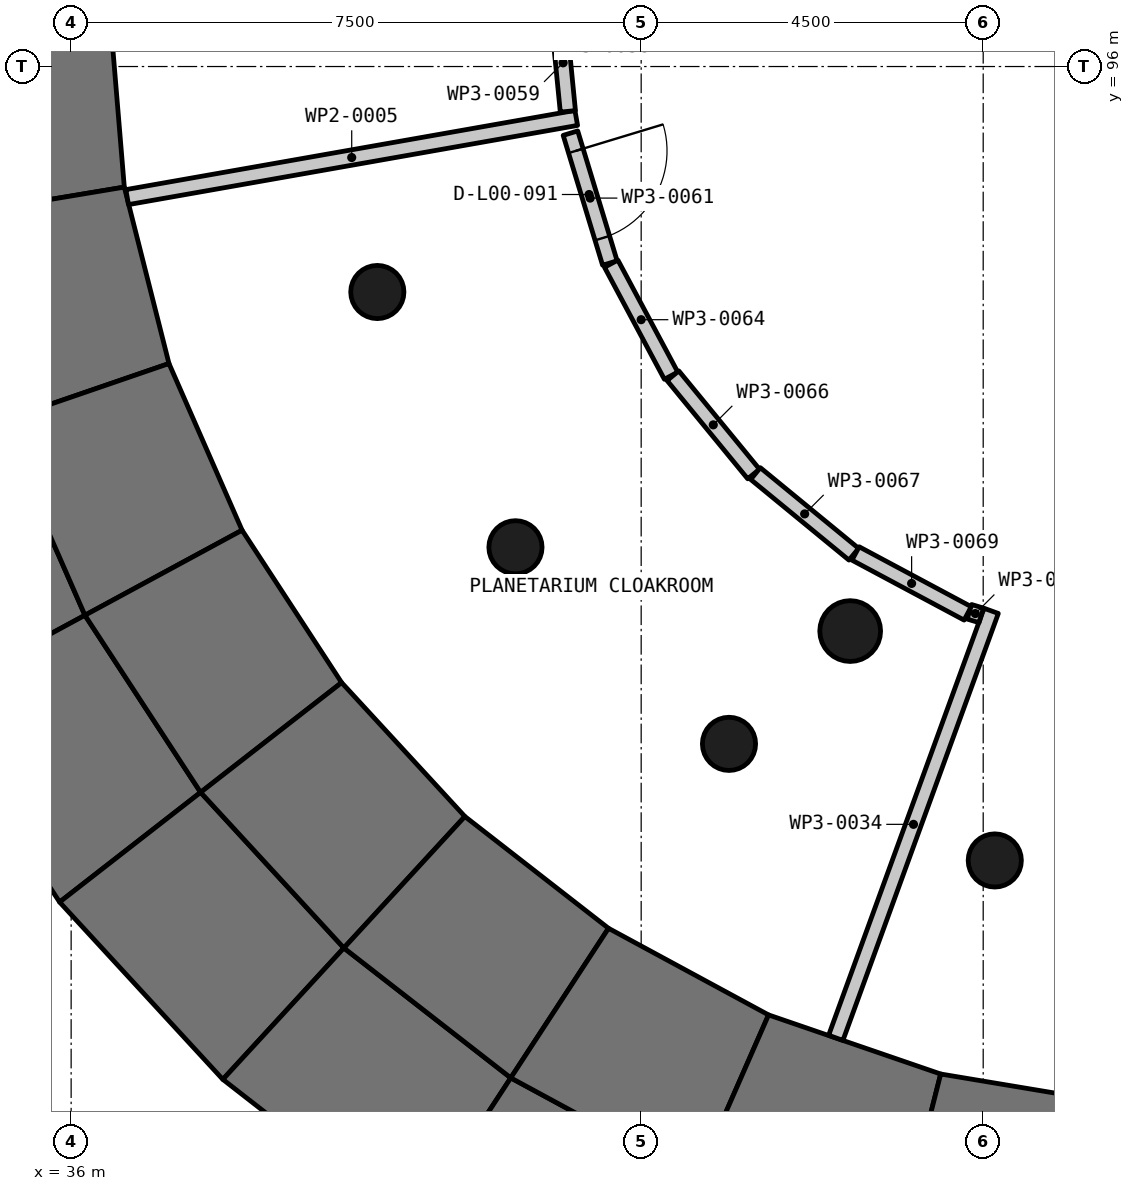
"""IFC4 building model, lengths in metres.
Left out: names, types, materials, properties, quantities, classifications, styles, units other than length and angle.
Written with IfcOpenShell. Run it as: python <this file> out.ifc"""

import sys

from ifc_helpers import new_model, si_unit, direction, frame, frame_2d, origin, origin_2d, place, context, subcontext, project, spatial, polyline, rectangle, circle, outline, extrude, element, fill, save


model = new_model("IFC4")
c1 = context("Model", 3, precision=1e-05, world=origin(), true_north=direction((0.0, 1.0)))
c2 = subcontext(c1, "Body", "Model", "MODEL_VIEW")
j1 = project(units=[si_unit("LENGTHUNIT", "METRE"), si_unit("PLANEANGLEUNIT", "RADIAN")], contexts=[c1])
p1 = place(None, origin())
s1 = spatial("IfcSite", under=j1, at=p1, CompositionType="ELEMENT")
p2 = place(p1, origin())
s2 = spatial("IfcBuilding", under=s1, at=p2, CompositionType="ELEMENT")
p3 = place(p2, origin())
s3 = spatial("IfcBuildingStorey", under=s2, at=p3, CompositionType="ELEMENT", Elevation=0.0)
p4 = place(p3, frame((46.25, 88.573, -0.2), z_axis=(0.0, 0.0, 1.0), x_axis=(1.0, 0.0, 0.0)))
e1 = element("IfcColumn", 1, at=p4, inside=s3, PredefinedType="COLUMN", context=c2, shape_type="SweptSolid", body=[
    extrude(circle(Radius=0.4, at=origin_2d()), origin(), (0.0, 0.0, 1.0), 5.9),
])
for number, where, z_axis, x_axis in (
    (2, (40.029, 93.033, -0.2), (0.0, 0.0, 1.0), (1.0, 0.0, 0.0)),
    (3, (41.846, 89.675, -0.2), (0.0, 0.0, 1.0), (1.0, 0.0, 0.0)),
    (4, (44.656, 87.089, -0.2), (0.0, 0.0, 1.0), (1.0, 0.0, 0.0)),
    (5, (48.152, 85.555, -0.2), (0.0, 0.0, 1.0), (1.0, 0.0, 0.0)),
):
    element("IfcColumn", number, at=place(p3, frame(where, z_axis=z_axis, x_axis=x_axis)), inside=s3, PredefinedType="COLUMN", context=c2, shape_type="SweptSolid", body=[
        extrude(circle(Radius=0.35, at=origin_2d()), origin(), (0.0, 0.0, 1.0), 5.9),
    ])
p5 = place(p3, frame((33.913, 91.036, -0.2), z_axis=(0.0, 0.0, 1.0), x_axis=(0.401654698368, -0.91579118978, 0.0)))
e6 = element("IfcWall", 6, at=p5, inside=s3, PredefinedType="SHEAR", context=c2, shape_type="SweptSolid", body=[
    extrude(outline(polyline([(0.0, -1.171), (3.171, -1.171), (2.977, 1.172), (0.194, 1.171), (0.0, -1.171)])), origin(), (0.0, 0.0, 1.0), 5.9),
])
p6 = place(p3, frame((35.095, 88.302, -0.2), z_axis=(0.0, 0.0, 1.0), x_axis=(0.546929878596, -0.837178420588, 0.0)))
e7 = element("IfcWall", 7, at=p6, inside=s3, PredefinedType="SHEAR", context=c2, shape_type="SweptSolid", body=[
    extrude(outline(polyline([(0.0, -1.171), (3.171, -1.171), (2.977, 1.171), (0.194, 1.172), (0.0, -1.171)])), origin(), (0.0, 0.0, 1.0), 5.9),
])
p7 = place(p3, frame((36.71, 85.801, -0.2), z_axis=(0.0, 0.0, 1.0), x_axis=(0.677243324002, -0.735759118254, 0.0)))
e8 = element("IfcWall", 8, at=p7, inside=s3, PredefinedType="SHEAR", context=c2, shape_type="SweptSolid", body=[
    extrude(outline(polyline([(0.0, -1.172), (3.171, -1.171), (2.977, 1.172), (0.194, 1.171), (0.0, -1.172)])), origin(), (0.0, 0.0, 1.0), 5.9),
])
p8 = place(p3, frame((38.716, 83.599, -0.2), z_axis=(0.0, 0.0, 1.0), x_axis=(0.789136599695, -0.614217735841, 0.0)))
e9 = element("IfcWall", 9, at=p8, inside=s3, PredefinedType="SHEAR", context=c2, shape_type="SweptSolid", body=[
    extrude(outline(polyline([(0.0, -1.172), (3.171, -1.172), (2.977, 1.172), (0.194, 1.171), (0.0, -1.172)])), origin(), (0.0, 0.0, 1.0), 5.9),
])
p9 = place(p3, frame((41.056, 81.757, -0.2), z_axis=(0.0, 0.0, 1.0), x_axis=(0.87946790064, -0.475958203778, 0.0)))
e10 = element("IfcWall", 10, at=p9, inside=s3, PredefinedType="SHEAR", context=c2, shape_type="SweptSolid", body=[
    extrude(outline(polyline([(0.0, -1.171), (3.171, -1.171), (2.977, 1.172), (0.194, 1.172), (0.0, -1.171)])), origin(), (0.0, 0.0, 1.0), 5.9),
])
p10 = place(p3, frame((35.318, 96.897, -0.2), z_axis=(0.0, 0.0, 1.0), x_axis=(0.082558992404, -0.996586179301, 0.0)))
e11 = element("IfcWall", 11, at=p10, inside=s3, PredefinedType="SHEAR", context=c2, shape_type="SweptSolid", body=[
    extrude(outline(polyline([(0.0, -1.171), (2.783, -1.171), (2.588, 1.171), (0.194, 1.171), (0.0, -1.171)])), origin(), (0.0, 0.0, 1.0), 5.9),
])
p11 = place(p3, frame((35.516, 94.314, -0.2), z_axis=(0.0, 0.0, 1.0), x_axis=(0.245569021983, -0.969379108214, 0.0)))
e12 = element("IfcWall", 12, at=p11, inside=s3, PredefinedType="SHEAR", context=c2, shape_type="SweptSolid", body=[
    extrude(outline(polyline([(0.0, -1.171), (2.783, -1.172), (2.589, 1.171), (0.194, 1.172), (0.0, -1.171)])), origin(), (0.0, 0.0, 1.0), 5.9),
])
p12 = place(p3, frame((36.136, 91.8, -0.2), z_axis=(0.0, 0.0, 1.0), x_axis=(0.401729909484, -0.915758199431, 0.0)))
e13 = element("IfcWall", 13, at=p12, inside=s3, PredefinedType="SHEAR", context=c2, shape_type="SweptSolid", body=[
    extrude(outline(polyline([(-0.0, -1.171), (2.783, -1.171), (2.589, 1.171), (0.194, 1.172), (-0.0, -1.171)])), origin(), (0.0, 0.0, 1.0), 5.9),
])
p13 = place(p3, frame((37.162, 89.421, -0.2), z_axis=(0.0, 0.0, 1.0), x_axis=(0.54694202516, -0.837170485095, 0.0)))
e14 = element("IfcWall", 14, at=p13, inside=s3, PredefinedType="SHEAR", context=c2, shape_type="SweptSolid", body=[
    extrude(outline(polyline([(0.0, -1.171), (2.783, -1.172), (2.589, 1.171), (0.194, 1.171), (0.0, -1.171)])), origin(), (0.0, 0.0, 1.0), 5.9),
])
p14 = place(p3, frame((38.565, 87.244, -0.2), z_axis=(0.0, 0.0, 1.0), x_axis=(0.677288370304, -0.735717651991, 0.0)))
e15 = element("IfcWall", 15, at=p14, inside=s3, PredefinedType="SHEAR", context=c2, shape_type="SweptSolid", body=[
    extrude(outline(polyline([(0.0, -1.171), (2.783, -1.171), (2.589, 1.172), (0.194, 1.172), (0.0, -1.171)])), origin(), (0.0, 0.0, 1.0), 5.9),
])
p15 = place(p3, frame((40.308, 85.328, -0.2), z_axis=(0.0, 0.0, 1.0), x_axis=(0.789144316107, -0.614207821797, 0.0)))
e16 = element("IfcWall", 16, at=p15, inside=s3, PredefinedType="SHEAR", context=c2, shape_type="SweptSolid", body=[
    extrude(outline(polyline([(0.0, -1.171), (2.783, -1.171), (2.589, 1.172), (0.194, 1.171), (0.0, -1.171)])), origin(), (0.0, 0.0, 1.0), 5.9),
])
p16 = place(p3, frame((42.342, 83.725, -0.2), z_axis=(0.0, 0.0, 1.0), x_axis=(0.87946337705, -0.4759665623, 0.0)))
e17 = element("IfcWall", 17, at=p16, inside=s3, PredefinedType="SHEAR", context=c2, shape_type="SweptSolid", body=[
    extrude(outline(polyline([(-0.0, -1.171), (2.782, -1.171), (2.588, 1.172), (0.194, 1.172), (-0.0, -1.171)])), origin(), (0.0, 0.0, 1.0), 5.9),
])
p17 = place(p3, frame((44.612, 82.478, -0.2), z_axis=(0.0, 0.0, 1.0), x_axis=(0.945820527965, -0.324689896485, 0.0)))
e18 = element("IfcWall", 18, at=p17, inside=s3, PredefinedType="SHEAR", context=c2, shape_type="SweptSolid", body=[
    extrude(outline(polyline([(0.0, -1.171), (2.783, -1.172), (2.589, 1.171), (0.194, 1.171), (0.0, -1.171)])), origin(), (0.0, 0.0, 1.0), 5.9),
])
p18 = place(p3, frame((47.057, 81.622, -0.2), z_axis=(0.0, 0.0, 1.0), x_axis=(0.98636308198, -0.164583931495, 0.0)))
e19 = element("IfcWall", 19, at=p18, inside=s3, PredefinedType="SHEAR", context=c2, shape_type="SweptSolid", body=[
    extrude(outline(polyline([(0.0, -1.171), (2.783, -1.171), (2.589, 1.171), (0.194, 1.171), (0.0, -1.171)])), origin(), (0.0, 0.0, 1.0), 5.9),
])
p19 = place(p3, frame((36.737, 94.282, 0.0), z_axis=(0.0, 0.0, 1.0), x_axis=(0.984809765879, 0.173636761746, 0.0)))
e20 = element("IfcWall", 20, at=p19, inside=s3, PredefinedType="PARTITIONING", context=c2, shape_type="SweptSolid", body=[
    extrude(rectangle(XDim=6.0, YDim=0.2, at=frame_2d((3.0, 0.0))), origin(), (0.0, 0.0, 1.0), 4.8),
])
p20 = place(p3, frame((46.061, 83.221, 0.0), z_axis=(0.0, 0.0, 1.0), x_axis=(0.342011951261, 0.939695602413, 0.0)))
e21 = element("IfcWall", 21, at=p20, inside=s3, PredefinedType="PARTITIONING", context=c2, shape_type="SweptSolid", body=[
    extrude(rectangle(XDim=5.978, YDim=0.2, at=frame_2d((2.989, 0.0))), origin(), (0.0, 0.0, 1.0), 4.8),
])
p21 = place(p3, frame((42.536, 95.41, 0.0), z_axis=(0.0, 0.0, 1.0), x_axis=(-0.097996402677, 0.995186768935, 0.0)))
e22 = element("IfcWall", 22, at=p21, inside=s3, PredefinedType="PARTITIONING", context=c2, shape_type="SweptSolid", body=[
    extrude(rectangle(XDim=1.283, YDim=0.2, at=frame_2d((0.642, 0.0))), origin(), (0.0, 0.0, 1.0), 4.8),
])
p22 = place(p3, frame((42.57, 95.124, 0.0), z_axis=(0.0, 0.0, 1.0), x_axis=(0.290356433396, -0.956918565807, 0.0)))
e23 = element("IfcWall", 23, at=p22, inside=s3, PredefinedType="PARTITIONING", context=c2, shape_type="SweptSolid", body=[
    extrude(rectangle(XDim=1.786, YDim=0.2, at=frame_2d((0.893, 0.0))), origin(), (0.0, 0.0, 1.0), 4.8),
])
p23 = place(p22, frame((0.244, 0.0, 0.0)))
e24 = element("IfcOpeningElement", 24, at=p23, cuts=e23, PredefinedType="OPENING", context=c2, shape_type="SweptSolid", body=[
    extrude(rectangle(XDim=1.2, YDim=2.1, at=frame_2d((0.6, 1.05))), frame((0.0, 0.11, 0.0), z_axis=(0.0, -1.0, 0.0), x_axis=(1.0, 0.0, 0.0)), (0.0, 0.0, 1.0), 0.22),
])
p24 = place(p3, frame((43.894, 91.932, 0.0), z_axis=(0.0, 0.0, 1.0), x_axis=(-0.471528100867, 0.881851036226, 0.0)))
e25 = element("IfcWall", 25, at=p24, inside=s3, PredefinedType="PARTITIONING", context=c2, shape_type="SweptSolid", body=[
    extrude(rectangle(XDim=1.671, YDim=0.2, at=frame_2d((0.836, 0.0))), origin(), (0.0, 0.0, 1.0), 4.8),
])
p25 = place(p3, frame((44.979, 90.639, 0.0), z_axis=(0.0, 0.0, 1.0), x_axis=(-0.634381463281, 0.773020154359, 0.0)))
e26 = element("IfcWall", 26, at=p25, inside=s3, PredefinedType="PARTITIONING", context=c2, shape_type="SweptSolid", body=[
    extrude(rectangle(XDim=1.673, YDim=0.2, at=frame_2d((0.836, 0.0))), origin(), (0.0, 0.0, 1.0), 4.8),
])
p26 = place(p3, frame((46.298, 89.583, 0.0), z_axis=(0.0, 0.0, 1.0), x_axis=(-0.773007321839, 0.634397099917, 0.0)))
e27 = element("IfcWall", 27, at=p26, inside=s3, PredefinedType="PARTITIONING", context=c2, shape_type="SweptSolid", body=[
    extrude(rectangle(XDim=1.673, YDim=0.2, at=frame_2d((0.837, 0.0))), origin(), (0.0, 0.0, 1.0), 4.8),
])
p27 = place(p3, frame((47.796, 88.805, 0.0), z_axis=(0.0, 0.0, 1.0), x_axis=(-0.881863670633, 0.471504471259, 0.0)))
e28 = element("IfcWall", 28, at=p27, inside=s3, PredefinedType="PARTITIONING", context=c2, shape_type="SweptSolid", body=[
    extrude(rectangle(XDim=1.673, YDim=0.2, at=frame_2d((0.836, 0.0))), origin(), (0.0, 0.0, 1.0), 4.8),
])
p28 = place(p3, frame((47.974, 88.779, 0.0), z_axis=(0.0, 0.0, 1.0), x_axis=(-0.95661930152, 0.291340886177, 0.0)))
e29 = element("IfcWall", 29, at=p28, inside=s3, PredefinedType="PARTITIONING", context=c2, shape_type="SweptSolid", body=[
    extrude(rectangle(XDim=0.163, YDim=0.2, at=frame_2d((0.081, 0.0))), origin(), (0.0, 0.0, 1.0), 4.8),
])
p29 = place(p23, origin())
e30 = element("IfcDoor", 30, at=p29, inside=s3, OperationType="SINGLE_SWING_RIGHT", PredefinedType="DOOR", context=c2, shape_type="SweptSolid", body=[
    extrude(rectangle(XDim=1.2, YDim=2.1, at=frame_2d((0.6, 1.05))), frame((0.0, 0.025, 0.0), z_axis=(0.0, -1.0, 0.0), x_axis=(1.0, 0.0, 0.0)), (0.0, 0.0, 1.0), 0.05),
])
fill(e24, e30)
save(model, sys.argv[1])
